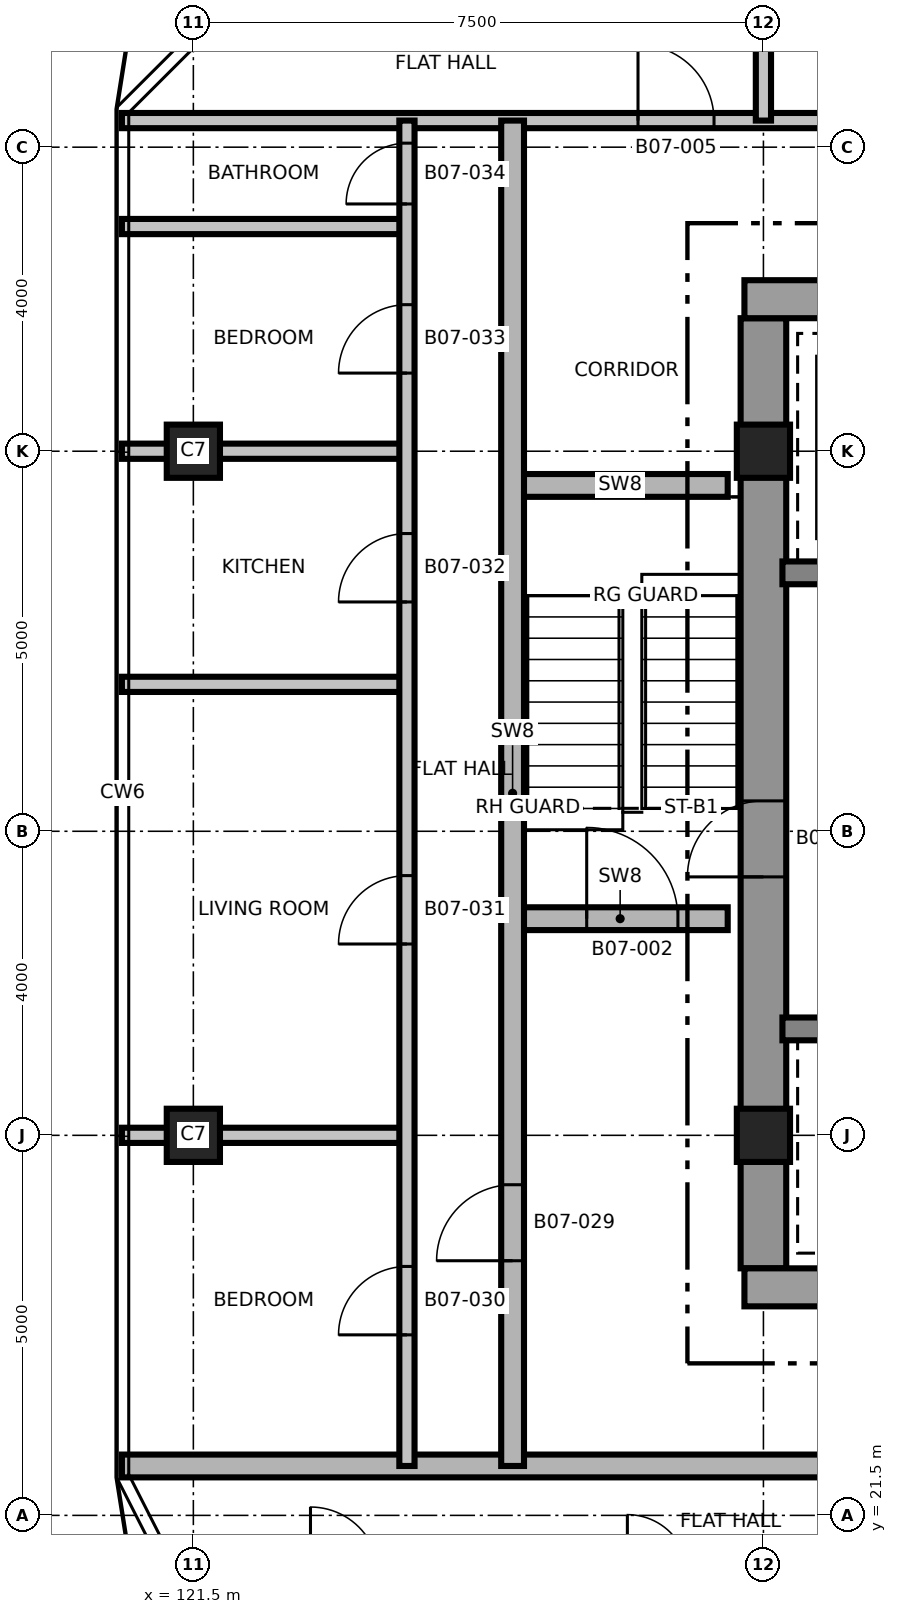
"""IFC4 building model, lengths in metres.
Left out: names, types, materials, properties, quantities, classifications, styles, units other than length and angle.
Written with IfcOpenShell. Run it as: python <this file> out.ifc"""

import sys

from ifc_helpers import new_model, si_unit, direction, frame, frame_2d, origin, origin_2d, place, context, subcontext, project, spatial, rectangle, extrude, element, fill, save


model = new_model("IFC4")
c1 = context("Model", 3, precision=1e-05, world=origin(), true_north=direction((0.0, 1.0)))
c2 = subcontext(c1, "Body", "Model", "MODEL_VIEW")
j1 = project(units=[si_unit("LENGTHUNIT", "METRE"), si_unit("PLANEANGLEUNIT", "RADIAN")], contexts=[c1])
p1 = place(None, origin())
s1 = spatial("IfcSite", under=j1, at=p1, CompositionType="ELEMENT")
p2 = place(p1, origin())
s2 = spatial("IfcBuilding", under=s1, at=p2, CompositionType="ELEMENT")
p3 = place(p2, frame((0.0, 0.0, 87.1)))
s3 = spatial("IfcBuildingStorey", under=s2, at=p3, CompositionType="ELEMENT", Elevation=87.1)
p4 = place(p3, frame((129.0, 24.75, 0.0), z_axis=(0.0, 0.0, 1.0), x_axis=(0.0, 1.0, 0.0)))
e1 = element("IfcWall", 1, at=p4, inside=s3, PredefinedType="SHEAR", context=c2, shape_type="SweptSolid", body=[
    extrude(rectangle(XDim=12.5, YDim=0.6, at=frame_2d((6.25, 0.0))), origin(), (0.0, 0.0, 1.0), 3.7),
])
p5 = place(p4, frame((5.15, 0.0, 0.0)))
e2 = element("IfcOpeningElement", 2, at=p5, cuts=e1, PredefinedType="OPENING", context=c2, shape_type="SweptSolid", body=[
    extrude(rectangle(XDim=1.0, YDim=2.1, at=frame_2d((0.5, 1.05))), frame((0.0, 0.31, 0.0), z_axis=(0.0, -1.0, 0.0), x_axis=(1.0, 0.0, 0.0)), (0.0, 0.0, 1.0), 0.62),
])
p6 = place(p3, frame((128.75, 24.5, 0.0), z_axis=(0.0, 0.0, 1.0), x_axis=(1.0, 0.0, 0.0)))
e3 = element("IfcWall", 3, at=p6, inside=s3, PredefinedType="SHEAR", context=c2, shape_type="SweptSolid", body=[
    extrude(rectangle(XDim=15.0, YDim=0.5, at=frame_2d((7.5, 0.0))), origin(), (0.0, 0.0, 1.0), 3.7),
])
p7 = place(p6, frame((9.65, 0.0, 0.0)))
e4 = element("IfcOpeningElement", 4, at=p7, cuts=e3, PredefinedType="OPENING", context=c2, shape_type="SweptSolid", body=[
    extrude(rectangle(XDim=1.5, YDim=2.1, at=frame_2d((0.75, 1.05))), frame((0.0, 0.26, 0.0), z_axis=(0.0, -1.0, 0.0), x_axis=(1.0, 0.0, 0.0)), (0.0, 0.0, 1.0), 0.52),
])
p8 = place(p6, frame((1.25, 0.0, 0.0)))
e5 = element("IfcOpeningElement", 5, at=p8, cuts=e3, PredefinedType="OPENING", context=c2, shape_type="SweptSolid", body=[
    extrude(rectangle(XDim=0.9, YDim=2.1, at=frame_2d((0.45, 1.05))), frame((0.0, 0.26, 0.0), z_axis=(0.0, -1.0, 0.0), x_axis=(1.0, 0.0, 0.0)), (0.0, 0.0, 1.0), 0.52),
])
p9 = place(p3, frame((128.75, 37.5, 0.0), z_axis=(0.0, 0.0, 1.0), x_axis=(1.0, 0.0, 0.0)))
e6 = element("IfcWall", 6, at=p9, inside=s3, PredefinedType="SHEAR", context=c2, shape_type="SweptSolid", body=[
    extrude(rectangle(XDim=15.0, YDim=0.5, at=frame_2d((7.5, 0.0))), origin(), (0.0, 0.0, 1.0), 3.7),
])
p10 = place(p9, frame((9.65, 0.0, 0.0)))
e7 = element("IfcOpeningElement", 7, at=p10, cuts=e6, PredefinedType="OPENING", context=c2, shape_type="SweptSolid", body=[
    extrude(rectangle(XDim=1.5, YDim=2.1, at=frame_2d((0.75, 1.05))), frame((0.0, 0.26, 0.0), z_axis=(0.0, -1.0, 0.0), x_axis=(1.0, 0.0, 0.0)), (0.0, 0.0, 1.0), 0.52),
])
p11 = place(p9, frame((12.85, 0.0, 0.0)))
e8 = element("IfcOpeningElement", 8, at=p11, cuts=e6, PredefinedType="OPENING", context=c2, shape_type="SweptSolid", body=[
    extrude(rectangle(XDim=0.9, YDim=2.1, at=frame_2d((0.45, 1.05))), frame((0.0, 0.26, 0.0), z_axis=(0.0, -1.0, 0.0), x_axis=(1.0, 0.0, 0.0)), (0.0, 0.0, 1.0), 0.52),
])
p12 = place(p9, frame((3.8, 0.0, 0.0)))
e9 = element("IfcOpeningElement", 9, at=p12, cuts=e6, PredefinedType="OPENING", context=c2, shape_type="SweptSolid", body=[
    extrude(rectangle(XDim=0.9, YDim=2.1, at=frame_2d((0.45, 1.05))), frame((0.0, 0.26, 0.0), z_axis=(0.0, -1.0, 0.0), x_axis=(1.0, 0.0, 0.0)), (0.0, 0.0, 1.0), 0.52),
])
p13 = place(p9, frame((6.7, 0.0, 0.0)))
e10 = element("IfcOpeningElement", 10, at=p13, cuts=e6, PredefinedType="OPENING", context=c2, shape_type="SweptSolid", body=[
    extrude(rectangle(XDim=0.9, YDim=2.1, at=frame_2d((0.45, 1.05))), frame((0.0, 0.26, 0.0), z_axis=(0.0, -1.0, 0.0), x_axis=(1.0, 0.0, 0.0)), (0.0, 0.0, 1.0), 0.52),
])
p14 = place(p3, frame((129.25, 27.9, 0.0), z_axis=(0.0, 0.0, 1.0), x_axis=(1.0, 0.0, 0.0)))
e11 = element("IfcWall", 11, at=p14, inside=s3, PredefinedType="SHEAR", context=c2, shape_type="SweptSolid", body=[
    extrude(rectangle(XDim=2.7, YDim=0.3, at=frame_2d((1.35, 0.0))), origin(), (0.0, 0.0, 1.0), 3.7),
])
p15 = place(p3, frame((129.25, 33.9, 0.0), z_axis=(0.0, 0.0, 1.0), x_axis=(1.0, 0.0, 0.0)))
e12 = element("IfcWall", 12, at=p15, inside=s3, PredefinedType="SHEAR", context=c2, shape_type="SweptSolid", body=[
    extrude(rectangle(XDim=2.7, YDim=0.3, at=frame_2d((1.35, 0.0))), origin(), (0.0, 0.0, 1.0), 3.7),
])
p16 = place(p15, frame((1.05, 0.0, 0.0)))
e13 = element("IfcOpeningElement", 13, at=p16, cuts=e12, PredefinedType="OPENING", context=c2, shape_type="SweptSolid", body=[
    extrude(rectangle(XDim=1.3, YDim=2.4, at=frame_2d((0.65, 1.2))), frame((0.0, 0.16, 0.0), z_axis=(0.0, -1.0, 0.0), x_axis=(1.0, 0.0, 0.0)), (0.0, 0.0, 1.0), 0.32),
])
for number, where, z_axis, x_axis in (
    (14, (121.5, 26.5, 0.0), (0.0, 0.0, 1.0), (1.0, 0.0, 0.0)),
    (15, (129.0, 26.5, 0.0), (0.0, 0.0, 1.0), (1.0, 0.0, 0.0)),
    (16, (121.5, 35.5, 0.0), (0.0, 0.0, 1.0), (1.0, 0.0, 0.0)),
    (17, (129.0, 35.5, 0.0), (0.0, 0.0, 1.0), (1.0, 0.0, 0.0)),
):
    element("IfcColumn", number, at=place(p3, frame(where, z_axis=z_axis, x_axis=x_axis)), inside=s3, PredefinedType="COLUMN", context=c2, shape_type="SweptSolid", body=[
        extrude(rectangle(XDim=0.7, YDim=0.7, at=origin_2d()), origin(), (0.0, 0.0, 1.0), 3.7),
    ])
p17 = place(p3, frame((120.56, 22.15, 0.0), z_axis=(0.0, 0.0, 1.0), x_axis=(1.0, 0.0, 0.0)))
e18 = element("IfcWall", 18, at=p17, inside=s3, PredefinedType="SHEAR", context=c2, shape_type="SweptSolid", body=[
    extrude(rectangle(XDim=31.88, YDim=0.3, at=frame_2d((15.94, 0.0))), origin(), (0.0, 0.0, 1.0), 3.4),
])
p18 = place(p17, frame((22.19, 0.0, 0.0)))
e19 = element("IfcOpeningElement", 19, at=p18, cuts=e18, PredefinedType="OPENING", context=c2, shape_type="SweptSolid", body=[
    extrude(rectangle(XDim=1.0, YDim=2.1, at=frame_2d((0.5, 1.05))), frame((0.0, 0.16, 0.0), z_axis=(0.0, -1.0, 0.0), x_axis=(1.0, 0.0, 0.0)), (0.0, 0.0, 1.0), 0.32),
])
p19 = place(p17, frame((10.54, 0.0, 0.0)))
e20 = element("IfcOpeningElement", 20, at=p19, cuts=e18, PredefinedType="OPENING", context=c2, shape_type="SweptSolid", body=[
    extrude(rectangle(XDim=1.0, YDim=2.1, at=frame_2d((0.5, 1.05))), frame((0.0, 0.16, 0.0), z_axis=(0.0, -1.0, 0.0), x_axis=(1.0, 0.0, 0.0)), (0.0, 0.0, 1.0), 0.32),
])
p20 = place(p17, frame((24.09, 0.0, 0.0)))
e21 = element("IfcOpeningElement", 21, at=p20, cuts=e18, PredefinedType="OPENING", context=c2, shape_type="SweptSolid", body=[
    extrude(rectangle(XDim=1.0, YDim=2.1, at=frame_2d((0.5, 1.05))), frame((0.0, 0.16, 0.0), z_axis=(0.0, -1.0, 0.0), x_axis=(1.0, 0.0, 0.0)), (0.0, 0.0, 1.0), 0.32),
])
p21 = place(p17, frame((16.19, 0.0, 0.0)))
e22 = element("IfcOpeningElement", 22, at=p21, cuts=e18, PredefinedType="OPENING", context=c2, shape_type="SweptSolid", body=[
    extrude(rectangle(XDim=0.9, YDim=2.1, at=frame_2d((0.45, 1.05))), frame((0.0, 0.16, 0.0), z_axis=(0.0, -1.0, 0.0), x_axis=(1.0, 0.0, 0.0)), (0.0, 0.0, 1.0), 0.32),
])
p22 = place(p3, frame((120.56, 26.5, 0.0), z_axis=(0.0, 0.0, 1.0), x_axis=(1.0, 0.0, 0.0)))
e23 = element("IfcWall", 23, at=p22, inside=s3, PredefinedType="PARTITIONING", context=c2, shape_type="SweptSolid", body=[
    extrude(rectangle(XDim=3.75, YDim=0.2, at=frame_2d((1.875, 0.0))), origin(), (0.0, 0.0, 1.0), 3.4),
])
p23 = place(p3, frame((125.7, 29.35, 0.0), z_axis=(0.0, 0.0, 1.0), x_axis=(1.0, 0.0, 0.0)))
e24 = element("IfcWall", 24, at=p23, inside=s3, PredefinedType="SHEAR", context=c2, shape_type="SweptSolid", body=[
    extrude(rectangle(XDim=2.83, YDim=0.3, at=frame_2d((1.415, 0.0))), origin(), (0.0, 0.0, 1.0), 3.4),
])
p24 = place(p23, frame((0.975, 0.0, 0.0)))
e25 = element("IfcOpeningElement", 25, at=p24, cuts=e24, PredefinedType="OPENING", context=c2, shape_type="SweptSolid", body=[
    extrude(rectangle(XDim=1.2, YDim=2.1, at=frame_2d((0.6, 1.05))), frame((0.0, 0.16, 0.0), z_axis=(0.0, -1.0, 0.0), x_axis=(1.0, 0.0, 0.0)), (0.0, 0.0, 1.0), 0.32),
])
p25 = place(p3, frame((120.56, 32.433, 0.0), z_axis=(0.0, 0.0, 1.0), x_axis=(1.0, 0.0, 0.0)))
e26 = element("IfcWall", 26, at=p25, inside=s3, PredefinedType="PARTITIONING", context=c2, shape_type="SweptSolid", body=[
    extrude(rectangle(XDim=3.75, YDim=0.2, at=frame_2d((1.875, 0.0))), origin(), (0.0, 0.0, 1.0), 3.4),
])
p26 = place(p3, frame((125.7, 35.05, 0.0), z_axis=(0.0, 0.0, 1.0), x_axis=(1.0, 0.0, 0.0)))
e27 = element("IfcWall", 27, at=p26, inside=s3, PredefinedType="SHEAR", context=c2, shape_type="SweptSolid", body=[
    extrude(rectangle(XDim=2.83, YDim=0.3, at=frame_2d((1.415, 0.0))), origin(), (0.0, 0.0, 1.0), 3.4),
])
for number, where, z_axis, x_axis in (
    (28, (120.56, 35.5, 0.0), (0.0, 0.0, 1.0), (1.0, 0.0, 0.0)),
    (29, (120.56, 38.456, 0.0), (0.0, 0.0, 1.0), (1.0, 0.0, 0.0)),
):
    element("IfcWall", number, at=place(p3, frame(where, z_axis=z_axis, x_axis=x_axis)), inside=s3, PredefinedType="PARTITIONING", context=c2, shape_type="SweptSolid", body=[
        extrude(rectangle(XDim=3.75, YDim=0.2, at=frame_2d((1.875, 0.0))), origin(), (0.0, 0.0, 1.0), 3.4),
    ])
p27 = place(p3, frame((120.56, 39.85, 0.0), z_axis=(0.0, 0.0, 1.0), x_axis=(1.0, 0.0, 0.0)))
e30 = element("IfcWall", 30, at=p27, inside=s3, PredefinedType="PARTITIONING", context=c2, shape_type="SweptSolid", body=[
    extrude(rectangle(XDim=31.88, YDim=0.2, at=frame_2d((15.94, 0.0))), origin(), (0.0, 0.0, 1.0), 3.4),
])
p28 = place(p27, frame((6.79, 0.0, 0.0)))
e31 = element("IfcOpeningElement", 31, at=p28, cuts=e30, PredefinedType="OPENING", context=c2, shape_type="SweptSolid", body=[
    extrude(rectangle(XDim=1.0, YDim=2.1, at=frame_2d((0.5, 1.05))), frame((0.0, 0.11, 0.0), z_axis=(0.0, -1.0, 0.0), x_axis=(1.0, 0.0, 0.0)), (0.0, 0.0, 1.0), 0.22),
])
p29 = place(p27, frame((15.44, 0.0, 0.0)))
e32 = element("IfcOpeningElement", 32, at=p29, cuts=e30, PredefinedType="OPENING", context=c2, shape_type="SweptSolid", body=[
    extrude(rectangle(XDim=1.0, YDim=2.1, at=frame_2d((0.5, 1.05))), frame((0.0, 0.11, 0.0), z_axis=(0.0, -1.0, 0.0), x_axis=(1.0, 0.0, 0.0)), (0.0, 0.0, 1.0), 0.22),
])
p30 = place(p27, frame((24.09, 0.0, 0.0)))
e33 = element("IfcOpeningElement", 33, at=p30, cuts=e30, PredefinedType="OPENING", context=c2, shape_type="SweptSolid", body=[
    extrude(rectangle(XDim=1.0, YDim=2.1, at=frame_2d((0.5, 1.05))), frame((0.0, 0.11, 0.0), z_axis=(0.0, -1.0, 0.0), x_axis=(1.0, 0.0, 0.0)), (0.0, 0.0, 1.0), 0.22),
])
p31 = place(p3, frame((124.31, 22.15, 0.0), z_axis=(0.0, 0.0, 1.0), x_axis=(0.0, 1.0, 0.0)))
e34 = element("IfcWall", 34, at=p31, inside=s3, PredefinedType="PARTITIONING", context=c2, shape_type="SweptSolid", body=[
    extrude(rectangle(XDim=17.7, YDim=0.2, at=frame_2d((8.85, 0.0))), origin(), (0.0, 0.0, 1.0), 3.4),
])
p32 = place(p31, frame((1.725, 0.0, 0.0)))
e35 = element("IfcOpeningElement", 35, at=p32, cuts=e34, PredefinedType="OPENING", context=c2, shape_type="SweptSolid", body=[
    extrude(rectangle(XDim=0.9, YDim=2.1, at=frame_2d((0.45, 1.05))), frame((0.0, 0.11, 0.0), z_axis=(0.0, -1.0, 0.0), x_axis=(1.0, 0.0, 0.0)), (0.0, 0.0, 1.0), 0.22),
])
p33 = place(p31, frame((6.867, 0.0, 0.0)))
e36 = element("IfcOpeningElement", 36, at=p33, cuts=e34, PredefinedType="OPENING", context=c2, shape_type="SweptSolid", body=[
    extrude(rectangle(XDim=0.9, YDim=2.1, at=frame_2d((0.45, 1.05))), frame((0.0, 0.11, 0.0), z_axis=(0.0, -1.0, 0.0), x_axis=(1.0, 0.0, 0.0)), (0.0, 0.0, 1.0), 0.22),
])
p34 = place(p31, frame((11.367, 0.0, 0.0)))
e37 = element("IfcOpeningElement", 37, at=p34, cuts=e34, PredefinedType="OPENING", context=c2, shape_type="SweptSolid", body=[
    extrude(rectangle(XDim=0.9, YDim=2.1, at=frame_2d((0.45, 1.05))), frame((0.0, 0.11, 0.0), z_axis=(0.0, -1.0, 0.0), x_axis=(1.0, 0.0, 0.0)), (0.0, 0.0, 1.0), 0.22),
])
p35 = place(p31, frame((14.378, 0.0, 0.0)))
e38 = element("IfcOpeningElement", 38, at=p35, cuts=e34, PredefinedType="OPENING", context=c2, shape_type="SweptSolid", body=[
    extrude(rectangle(XDim=0.9, YDim=2.1, at=frame_2d((0.45, 1.05))), frame((0.0, 0.11, 0.0), z_axis=(0.0, -1.0, 0.0), x_axis=(1.0, 0.0, 0.0)), (0.0, 0.0, 1.0), 0.22),
])
p36 = place(p31, frame((16.603, 0.0, 0.0)))
e39 = element("IfcOpeningElement", 39, at=p36, cuts=e34, PredefinedType="OPENING", context=c2, shape_type="SweptSolid", body=[
    extrude(rectangle(XDim=0.8, YDim=2.1, at=frame_2d((0.4, 1.05))), frame((0.0, 0.11, 0.0), z_axis=(0.0, -1.0, 0.0), x_axis=(1.0, 0.0, 0.0)), (0.0, 0.0, 1.0), 0.22),
])
p37 = place(p3, frame((125.7, 22.15, 0.0), z_axis=(0.0, 0.0, 1.0), x_axis=(0.0, 1.0, 0.0)))
e40 = element("IfcWall", 40, at=p37, inside=s3, PredefinedType="SHEAR", context=c2, shape_type="SweptSolid", body=[
    extrude(rectangle(XDim=17.7, YDim=0.3, at=frame_2d((8.85, 0.0))), origin(), (0.0, 0.0, 1.0), 3.4),
])
p38 = place(p37, frame((2.7, 0.0, 0.0)))
e41 = element("IfcOpeningElement", 41, at=p38, cuts=e40, PredefinedType="OPENING", context=c2, shape_type="SweptSolid", body=[
    extrude(rectangle(XDim=1.0, YDim=2.1, at=frame_2d((0.5, 1.05))), frame((0.0, 0.16, 0.0), z_axis=(0.0, -1.0, 0.0), x_axis=(1.0, 0.0, 0.0)), (0.0, 0.0, 1.0), 0.32),
])
p39 = place(p3, frame((129.0, 39.85, 0.0), z_axis=(0.0, 0.0, 1.0), x_axis=(0.0, 1.0, 0.0)))
e42 = element("IfcWall", 42, at=p39, inside=s3, PredefinedType="PARTITIONING", context=c2, shape_type="SweptSolid", body=[
    extrude(rectangle(XDim=5.59, YDim=0.2, at=frame_2d((2.795, 0.0))), origin(), (0.0, 0.0, 1.0), 3.4),
])
p40 = place(p24, origin())
e43 = element("IfcDoor", 43, at=p40, inside=s3, OperationType="SINGLE_SWING_RIGHT", PredefinedType="DOOR", context=c2, shape_type="SweptSolid", body=[
    extrude(rectangle(XDim=1.2, YDim=2.1, at=frame_2d((0.6, 1.05))), frame((0.0, 0.025, 0.0), z_axis=(0.0, -1.0, 0.0), x_axis=(1.0, 0.0, 0.0)), (0.0, 0.0, 1.0), 0.05),
])
fill(e25, e43)
p41 = place(p28, origin())
e44 = element("IfcDoor", 44, at=p41, inside=s3, OperationType="SINGLE_SWING_LEFT", PredefinedType="DOOR", context=c2, shape_type="SweptSolid", body=[
    extrude(rectangle(XDim=1.0, YDim=2.1, at=frame_2d((0.5, 1.05))), frame((0.0, 0.025, 0.0), z_axis=(0.0, -1.0, 0.0), x_axis=(1.0, 0.0, 0.0)), (0.0, 0.0, 1.0), 0.05),
])
fill(e31, e44)
p42 = place(p38, origin())
e45 = element("IfcDoor", 45, at=p42, inside=s3, OperationType="SINGLE_SWING_LEFT", PredefinedType="DOOR", context=c2, shape_type="SweptSolid", body=[
    extrude(rectangle(XDim=1.0, YDim=2.1, at=frame_2d((0.5, 1.05))), frame((0.0, 0.025, 0.0), z_axis=(0.0, -1.0, 0.0), x_axis=(1.0, 0.0, 0.0)), (0.0, 0.0, 1.0), 0.05),
])
fill(e41, e45)
p43 = place(p32, origin())
e46 = element("IfcDoor", 46, at=p43, inside=s3, OperationType="SINGLE_SWING_RIGHT", PredefinedType="DOOR", context=c2, shape_type="SweptSolid", body=[
    extrude(rectangle(XDim=0.9, YDim=2.1, at=frame_2d((0.45, 1.05))), frame((0.0, 0.025, 0.0), z_axis=(0.0, -1.0, 0.0), x_axis=(1.0, 0.0, 0.0)), (0.0, 0.0, 1.0), 0.05),
])
fill(e35, e46)
p44 = place(p33, origin())
e47 = element("IfcDoor", 47, at=p44, inside=s3, OperationType="SINGLE_SWING_LEFT", PredefinedType="DOOR", context=c2, shape_type="SweptSolid", body=[
    extrude(rectangle(XDim=0.9, YDim=2.1, at=frame_2d((0.45, 1.05))), frame((0.0, 0.025, 0.0), z_axis=(0.0, -1.0, 0.0), x_axis=(1.0, 0.0, 0.0)), (0.0, 0.0, 1.0), 0.05),
])
fill(e36, e47)
p45 = place(p34, origin())
e48 = element("IfcDoor", 48, at=p45, inside=s3, OperationType="SINGLE_SWING_RIGHT", PredefinedType="DOOR", context=c2, shape_type="SweptSolid", body=[
    extrude(rectangle(XDim=0.9, YDim=2.1, at=frame_2d((0.45, 1.05))), frame((0.0, 0.025, 0.0), z_axis=(0.0, -1.0, 0.0), x_axis=(1.0, 0.0, 0.0)), (0.0, 0.0, 1.0), 0.05),
])
fill(e37, e48)
p46 = place(p35, origin())
e49 = element("IfcDoor", 49, at=p46, inside=s3, OperationType="SINGLE_SWING_LEFT", PredefinedType="DOOR", context=c2, shape_type="SweptSolid", body=[
    extrude(rectangle(XDim=0.9, YDim=2.1, at=frame_2d((0.45, 1.05))), frame((0.0, 0.025, 0.0), z_axis=(0.0, -1.0, 0.0), x_axis=(1.0, 0.0, 0.0)), (0.0, 0.0, 1.0), 0.05),
])
fill(e38, e49)
p47 = place(p36, origin())
e50 = element("IfcDoor", 50, at=p47, inside=s3, OperationType="SINGLE_SWING_RIGHT", PredefinedType="DOOR", context=c2, shape_type="SweptSolid", body=[
    extrude(rectangle(XDim=0.8, YDim=2.1, at=frame_2d((0.4, 1.05))), frame((0.0, 0.025, 0.0), z_axis=(0.0, -1.0, 0.0), x_axis=(1.0, 0.0, 0.0)), (0.0, 0.0, 1.0), 0.05),
])
fill(e39, e50)
p48 = place(p5, origin())
e51 = element("IfcDoor", 51, at=p48, inside=s3, OperationType="SINGLE_SWING_RIGHT", PredefinedType="DOOR", context=c2, shape_type="SweptSolid", body=[
    extrude(rectangle(XDim=1.0, YDim=2.1, at=frame_2d((0.5, 1.05))), frame((0.0, 0.025, 0.0), z_axis=(0.0, -1.0, 0.0), x_axis=(1.0, 0.0, 0.0)), (0.0, 0.0, 1.0), 0.05),
])
fill(e2, e51)
save(model, sys.argv[1])
